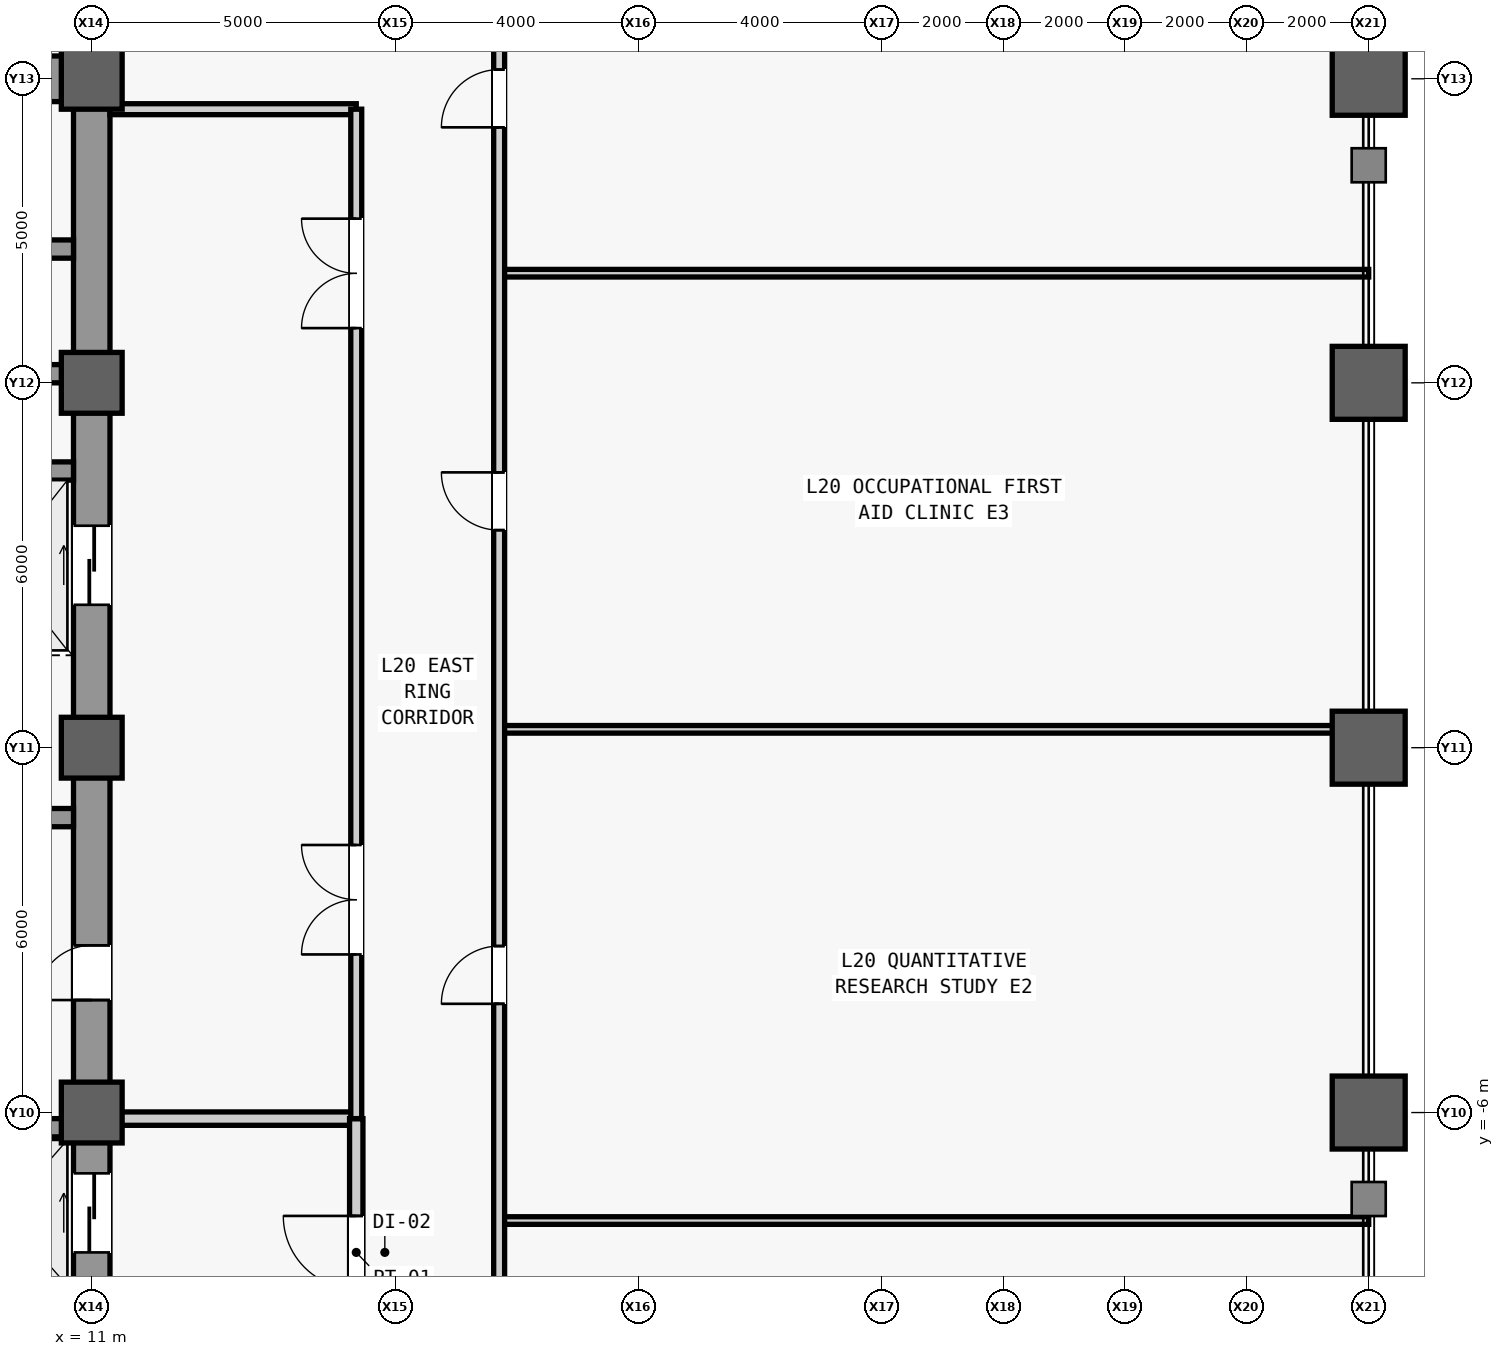
"""IFC4 building model, lengths in metres.
Left out: names, types, materials, properties, quantities, classifications, styles, units other than length and angle.
Written with IfcOpenShell. Run it as: python <this file> out.ifc"""

import sys

from ifc_helpers import new_model, si_unit, direction, frame, frame_2d, origin, origin_2d, place, context, subcontext, project, spatial, rectangle, hollow_rectangle, extrude, source, transform, mapped, element, fill, save


model = new_model("IFC4")
c1 = context("Model", 3, precision=1e-05, world=origin(), true_north=direction((0.0, 1.0)))
c2 = subcontext(c1, "Body", "Model", "MODEL_VIEW")
j1 = project(units=[si_unit("LENGTHUNIT", "METRE"), si_unit("PLANEANGLEUNIT", "RADIAN")], contexts=[c1])
p1 = place(None, origin())
s1 = spatial("IfcSite", under=j1, at=p1, CompositionType="ELEMENT")
p2 = place(p1, origin())
s2 = spatial("IfcBuilding", under=s1, at=p2, CompositionType="ELEMENT")
p3 = place(p2, frame((0.0, 0.0, 91.4)))
s3 = spatial("IfcBuildingStorey", under=s2, at=p3, CompositionType="ELEMENT", Elevation=91.4)
m1 = source(origin(), c2, "Body", "SweptSolid", [
    extrude(rectangle(XDim=22.0, YDim=0.6, at=frame_2d((11.0, 0.0))), origin(), (0.0, 0.0, 1.0), 3.84),
])
p4 = place(p3, frame((11.0, -11.0, 0.0), z_axis=(0.0, 0.0, 1.0), x_axis=(0.0, 1.0, 0.0)))
e1 = element("IfcWall", 1, at=p4, inside=s3, PredefinedType="SHEAR", context=c2, shape_type="MappedRepresentation", body=[
    mapped(m1, transform((0.0, 0.0, 0.0), scale=1.0)),
])
m2 = source(origin(), c2, "Body", "SweptSolid", [
    extrude(rectangle(XDim=1.1, YDim=2.2, at=frame_2d((0.55, 1.1))), frame((0.0, 0.31, 0.0), z_axis=(0.0, -1.0, 0.0), x_axis=(1.0, 0.0, 0.0)), (0.0, 0.0, 1.0), 0.62),
])
p5 = place(p4, frame((0.8, 0.0, 0.0)))
e2 = element("IfcOpeningElement", 2, at=p5, cuts=e1, PredefinedType="OPENING", context=c2, shape_type="MappedRepresentation", body=[
    mapped(m2, transform((0.0, 0.0, 0.0), scale=1.0)),
])
m3 = source(origin(), c2, "Body", "SweptSolid", [
    extrude(rectangle(XDim=0.9, YDim=2.15, at=frame_2d((0.45, 1.075))), frame((0.0, 0.31, 0.0), z_axis=(0.0, -1.0, 0.0), x_axis=(1.0, 0.0, 0.0)), (0.0, 0.0, 1.0), 0.62),
])
p6 = place(p4, frame((6.85, 0.0, 0.0)))
e3 = element("IfcOpeningElement", 3, at=p6, cuts=e1, PredefinedType="OPENING", context=c2, shape_type="MappedRepresentation", body=[
    mapped(m3, transform((0.0, 0.0, 0.0), scale=1.0)),
])
m4 = source(origin(), c2, "Body", "SweptSolid", [
    extrude(rectangle(XDim=1.3, YDim=2.3, at=frame_2d((0.65, 1.15))), frame((0.0, 0.31, 0.0), z_axis=(0.0, -1.0, 0.0), x_axis=(1.0, 0.0, 0.0)), (0.0, 0.0, 1.0), 0.62),
])
p7 = place(p4, frame((2.7, 0.0, 0.0)))
e4 = element("IfcOpeningElement", 4, at=p7, cuts=e1, PredefinedType="OPENING", context=c2, shape_type="MappedRepresentation", body=[
    mapped(m4, transform((0.0, 0.0, 0.0), scale=1.0)),
])
p8 = place(p4, frame((13.35, 0.0, 0.0)))
e5 = element("IfcOpeningElement", 5, at=p8, cuts=e1, PredefinedType="OPENING", context=c2, shape_type="MappedRepresentation", body=[
    mapped(m4, transform((0.0, 0.0, 0.0), scale=1.0)),
])
m5 = source(origin(), c2, "Body", "SweptSolid", [
    extrude(rectangle(XDim=5.85, YDim=0.75, at=frame_2d((2.925, 0.0))), origin(), (0.0, 0.0, 1.0), 3.84),
])
p9 = place(p3, frame((4.85, 11.0, 0.0), z_axis=(0.0, 0.0, 1.0), x_axis=(1.0, 0.0, 0.0)))
e6 = element("IfcWall", 6, at=p9, inside=s3, PredefinedType="SHEAR", context=c2, shape_type="MappedRepresentation", body=[
    mapped(m5, transform((0.0, 0.0, 0.0), scale=1.0)),
])
m6 = source(origin(), c2, "Body", "SweptSolid", [
    extrude(rectangle(XDim=1.05, YDim=2.2, at=frame_2d((0.525, 1.1))), frame((0.0, 0.385, 0.0), z_axis=(0.0, -1.0, 0.0), x_axis=(1.0, 0.0, 0.0)), (0.0, 0.0, 1.0), 0.77),
])
p10 = place(p9, frame((1.375, 0.0, 0.0)))
e7 = element("IfcOpeningElement", 7, at=p10, cuts=e6, PredefinedType="OPENING", context=c2, shape_type="MappedRepresentation", body=[
    mapped(m6, transform((0.0, 0.0, 0.0), scale=1.0)),
])
m7 = source(origin(), c2, "Body", "SweptSolid", [
    extrude(rectangle(XDim=5.6, YDim=0.3, at=frame_2d((2.8, 0.0))), origin(), (0.0, 0.0, 1.0), 3.84),
])
p11 = place(p3, frame((5.1, -1.15, 0.0), z_axis=(0.0, 0.0, 1.0), x_axis=(1.0, 0.0, 0.0)))
e8 = element("IfcWall", 8, at=p11, inside=s3, PredefinedType="SHEAR", context=c2, shape_type="MappedRepresentation", body=[
    mapped(m7, transform((0.0, 0.0, 0.0), scale=1.0)),
])
m8 = source(origin(), c2, "Body", "SweptSolid", [
    extrude(rectangle(XDim=1.0, YDim=1.0, at=origin_2d()), origin(), (0.0, 0.0, 1.0), 4.1),
])
for number, where, z_axis, x_axis in (
    (9, (11.0, -6.0, 0.0), (0.0, 0.0, 1.0), (1.0, 0.0, 0.0)),
    (10, (11.0, 0.0, 0.0), (0.0, 0.0, 1.0), (1.0, 0.0, 0.0)),
    (11, (11.0, 6.0, 0.0), (0.0, 0.0, 1.0), (1.0, 0.0, 0.0)),
    (12, (11.0, 11.0, 0.0), (0.0, 0.0, 1.0), (1.0, 0.0, 0.0)),
):
    element("IfcColumn", number, at=place(p3, frame(where, z_axis=z_axis, x_axis=x_axis)), inside=s3, PredefinedType="COLUMN", context=c2, shape_type="MappedRepresentation", body=[
        mapped(m8, transform((0.0, 0.0, 0.0), scale=1.0)),
    ])
m9 = source(origin(), c2, "Body", "SweptSolid", [
    extrude(hollow_rectangle(XDim=1.2, YDim=1.2, WallThickness=0.07, at=origin_2d()), origin(), (0.0, 0.0, 1.0), 4.1),
])
for number, where, z_axis, x_axis in (
    (13, (32.0, -6.0, 0.0), (0.0, 0.0, 1.0), (1.0, 0.0, 0.0)),
    (14, (32.0, 0.0, 0.0), (0.0, 0.0, 1.0), (1.0, 0.0, 0.0)),
    (15, (32.0, 6.0, 0.0), (0.0, 0.0, 1.0), (1.0, 0.0, 0.0)),
    (16, (32.0, 11.0, 0.0), (0.0, 0.0, 1.0), (1.0, 0.0, 0.0)),
):
    element("IfcColumn", number, at=place(p3, frame(where, z_axis=z_axis, x_axis=x_axis)), inside=s3, PredefinedType="COLUMN", context=c2, shape_type="MappedRepresentation", body=[
        mapped(m9, transform((0.0, 0.0, 0.0), scale=1.0)),
    ])
m10 = source(origin(), c2, "Body", "SweptSolid", [
    extrude(rectangle(XDim=2.2, YDim=0.3, at=frame_2d((1.1, 0.0))), origin(), (0.0, 0.0, 1.0), 3.84),
])
p12 = place(p3, frame((8.5, -6.25, 0.0), z_axis=(0.0, 0.0, 1.0), x_axis=(1.0, 0.0, 0.0)))
e17 = element("IfcWall", 17, at=p12, inside=s3, PredefinedType="SHEAR", context=c2, shape_type="MappedRepresentation", body=[
    mapped(m10, transform((0.0, 0.0, 0.0), scale=1.0)),
])
m11 = source(origin(), c2, "Body", "SweptSolid", [
    extrude(rectangle(XDim=2.3, YDim=0.3, at=frame_2d((1.15, 0.0))), origin(), (0.0, 0.0, 1.0), 3.84),
])
for number, where, z_axis, x_axis in (
    (18, (8.4, 4.55, 0.0), (0.0, 0.0, 1.0), (1.0, 0.0, 0.0)),
    (19, (8.4, 6.15, 0.0), (0.0, 0.0, 1.0), (1.0, 0.0, 0.0)),
    (20, (8.4, 8.2, 0.0), (0.0, 0.0, 1.0), (1.0, 0.0, 0.0)),
):
    element("IfcWall", number, at=place(p3, frame(where, z_axis=z_axis, x_axis=x_axis)), inside=s3, PredefinedType="SHEAR", context=c2, shape_type="MappedRepresentation", body=[
        mapped(m11, transform((0.0, 0.0, 0.0), scale=1.0)),
    ])
m12 = source(origin(), c2, "Body", "SweptSolid", [
    extrude(rectangle(XDim=4.05, YDim=0.22, at=frame_2d((2.025, 0.0))), origin(), (0.0, 0.0, 1.0), 3.067),
])
p13 = place(p3, frame((11.3, -6.1, 0.0), z_axis=(0.0, 0.0, 1.0), x_axis=(1.0, 0.0, 0.0)))
e21 = element("IfcWall", 21, at=p13, inside=s3, PredefinedType="PARTITIONING", context=c2, shape_type="MappedRepresentation", body=[
    mapped(m12, transform((0.0, 0.0, 0.0), scale=1.0)),
])
m13 = source(origin(), c2, "Body", "SweptSolid", [
    extrude(rectangle(XDim=4.4, YDim=0.22, at=frame_2d((2.2, 0.0))), origin(), (0.0, 0.0, 1.0), 3.84),
])
p14 = place(p3, frame((15.35, -10.5, 0.0), z_axis=(0.0, 0.0, 1.0), x_axis=(0.0, 1.0, 0.0)))
e22 = element("IfcWall", 22, at=p14, inside=s3, PredefinedType="PARTITIONING", context=c2, shape_type="MappedRepresentation", body=[
    mapped(m13, transform((0.0, 0.0, 0.0), scale=1.0)),
])
m14 = source(origin(), c2, "Body", "SweptSolid", [
    extrude(rectangle(XDim=1.2, YDim=2.2, at=frame_2d((0.6, 1.1))), frame((0.0, 0.12, 0.0), z_axis=(0.0, -1.0, 0.0), x_axis=(1.0, 0.0, 0.0)), (0.0, 0.0, 1.0), 0.24),
])
p15 = place(p14, frame((1.6, 0.0, 0.0)))
e23 = element("IfcOpeningElement", 23, at=p15, cuts=e22, PredefinedType="OPENING", context=c2, shape_type="MappedRepresentation", body=[
    mapped(m14, transform((0.0, 0.0, 0.0), scale=1.0)),
])
m15 = source(origin(), c2, "Body", "SweptSolid", [
    extrude(rectangle(XDim=4.05, YDim=0.18, at=frame_2d((2.025, 0.0))), origin(), (0.0, 0.0, 1.0), 3.84),
])
p16 = place(p3, frame((11.3, 10.5, 0.0), z_axis=(0.0, 0.0, 1.0), x_axis=(1.0, 0.0, 0.0)))
e24 = element("IfcWall", 24, at=p16, inside=s3, PredefinedType="PARTITIONING", context=c2, shape_type="MappedRepresentation", body=[
    mapped(m15, transform((0.0, 0.0, 0.0), scale=1.0)),
])
m16 = source(origin(), c2, "Body", "SweptSolid", [
    extrude(rectangle(XDim=16.6, YDim=0.18, at=frame_2d((8.3, 0.0))), origin(), (0.0, 0.0, 1.0), 3.84),
])
p17 = place(p3, frame((15.35, -6.1, 0.0), z_axis=(0.0, 0.0, 1.0), x_axis=(0.0, 1.0, 0.0)))
e25 = element("IfcWall", 25, at=p17, inside=s3, PredefinedType="PARTITIONING", context=c2, shape_type="MappedRepresentation", body=[
    mapped(m16, transform((0.0, 0.0, 0.0), scale=1.0)),
])
m17 = source(origin(), c2, "Body", "SweptSolid", [
    extrude(rectangle(XDim=1.8, YDim=2.25, at=frame_2d((0.9, 1.125))), frame((0.0, 0.1, 0.0), z_axis=(0.0, -1.0, 0.0), x_axis=(1.0, 0.0, 0.0)), (0.0, 0.0, 1.0), 0.2),
])
p18 = place(p17, frame((2.7, 0.0, 0.0)))
e26 = element("IfcOpeningElement", 26, at=p18, cuts=e25, PredefinedType="OPENING", context=c2, shape_type="MappedRepresentation", body=[
    mapped(m17, transform((0.0, 0.0, 0.0), scale=1.0)),
])
p19 = place(p17, frame((13.0, 0.0, 0.0)))
e27 = element("IfcOpeningElement", 27, at=p19, cuts=e25, PredefinedType="OPENING", context=c2, shape_type="MappedRepresentation", body=[
    mapped(m17, transform((0.0, 0.0, 0.0), scale=1.0)),
])
m18 = source(origin(), c2, "Body", "SweptSolid", [
    extrude(rectangle(XDim=14.3, YDim=0.125, at=frame_2d((7.15, 0.0))), origin(), (0.0, 0.0, 1.0), 3.84),
])
p20 = place(p3, frame((17.7, -7.776, 0.0), z_axis=(0.0, 0.0, 1.0), x_axis=(1.0, 0.0, 0.0)))
e28 = element("IfcWall", 28, at=p20, inside=s3, PredefinedType="PARTITIONING", context=c2, shape_type="MappedRepresentation", body=[
    mapped(m18, transform((0.0, 0.0, 0.0), scale=1.0)),
])
m19 = source(origin(), c2, "Body", "SweptSolid", [
    extrude(rectangle(XDim=14.3, YDim=0.125, at=frame_2d((7.15, 0.0))), origin(), (0.0, 0.0, 1.0), 3.067),
])
p21 = place(p3, frame((17.7, 0.302, 0.0), z_axis=(0.0, 0.0, 1.0), x_axis=(1.0, 0.0, 0.0)))
e29 = element("IfcWall", 29, at=p21, inside=s3, PredefinedType="PARTITIONING", context=c2, shape_type="MappedRepresentation", body=[
    mapped(m19, transform((0.0, 0.0, 0.0), scale=1.0)),
])
p22 = place(p3, frame((17.7, 7.803, 0.0), z_axis=(0.0, 0.0, 1.0), x_axis=(1.0, 0.0, 0.0)))
e30 = element("IfcWall", 30, at=p22, inside=s3, PredefinedType="PARTITIONING", context=c2, shape_type="MappedRepresentation", body=[
    mapped(m18, transform((0.0, 0.0, 0.0), scale=1.0)),
])
m20 = source(origin(), c2, "Body", "SweptSolid", [
    extrude(rectangle(XDim=56.0, YDim=0.18, at=frame_2d((28.0, 0.0))), origin(), (0.0, 0.0, 1.0), 3.84),
])
p23 = place(p3, frame((17.7, -28.0, 0.0), z_axis=(0.0, 0.0, 1.0), x_axis=(0.0, 1.0, 0.0)))
e31 = element("IfcWall", 31, at=p23, inside=s3, PredefinedType="PARTITIONING", context=c2, shape_type="MappedRepresentation", body=[
    mapped(m20, transform((0.0, 0.0, 0.0), scale=1.0)),
])
m21 = source(origin(), c2, "Body", "SweptSolid", [
    extrude(rectangle(XDim=0.95, YDim=2.15, at=frame_2d((0.475, 1.075))), frame((0.0, 0.1, 0.0), z_axis=(0.0, -1.0, 0.0), x_axis=(1.0, 0.0, 0.0)), (0.0, 0.0, 1.0), 0.2),
])
p24 = place(p23, frame((16.587, 0.0, 0.0)))
e32 = element("IfcOpeningElement", 32, at=p24, cuts=e31, PredefinedType="OPENING", context=c2, shape_type="MappedRepresentation", body=[
    mapped(m21, transform((0.0, 0.0, 0.0), scale=1.0)),
])
p25 = place(p23, frame((23.788, 0.0, 0.0)))
e33 = element("IfcOpeningElement", 33, at=p25, cuts=e31, PredefinedType="OPENING", context=c2, shape_type="MappedRepresentation", body=[
    mapped(m21, transform((0.0, 0.0, 0.0), scale=1.0)),
])
p26 = place(p23, frame((31.577, 0.0, 0.0)))
e34 = element("IfcOpeningElement", 34, at=p26, cuts=e31, PredefinedType="OPENING", context=c2, shape_type="MappedRepresentation", body=[
    mapped(m21, transform((0.0, 0.0, 0.0), scale=1.0)),
])
p27 = place(p23, frame((38.201, 0.0, 0.0)))
e35 = element("IfcOpeningElement", 35, at=p27, cuts=e31, PredefinedType="OPENING", context=c2, shape_type="MappedRepresentation", body=[
    mapped(m21, transform((0.0, 0.0, 0.0), scale=1.0)),
])
m22 = source(origin(), c2, "Body", "SweptSolid", [
    extrude(rectangle(XDim=0.9, YDim=2.15, at=frame_2d((0.45, 1.075))), frame((0.0, 0.025, 0.0), z_axis=(0.0, -1.0, 0.0), x_axis=(1.0, 0.0, 0.0)), (0.0, 0.0, 1.0), 0.05),
])
p28 = place(p6, origin())
e36 = element("IfcDoor", 36, at=p28, inside=s3, OperationType="SINGLE_SWING_LEFT", PredefinedType="DOOR", context=c2, shape_type="MappedRepresentation", body=[
    mapped(m22, transform((0.0, 0.0, 0.0), scale=1.0)),
])
fill(e3, e36)
m23 = source(origin(), c2, "Body", "SweptSolid", [
    extrude(rectangle(XDim=1.2, YDim=2.2, at=frame_2d((0.6, 1.1))), frame((0.0, 0.025, 0.0), z_axis=(0.0, -1.0, 0.0), x_axis=(1.0, 0.0, 0.0)), (0.0, 0.0, 1.0), 0.05),
])
p29 = place(p15, origin())
e37 = element("IfcDoor", 37, at=p29, inside=s3, OperationType="SINGLE_SWING_RIGHT", PredefinedType="DOOR", context=c2, shape_type="MappedRepresentation", body=[
    mapped(m23, transform((0.0, 0.0, 0.0), scale=1.0)),
])
fill(e23, e37)
m24 = source(origin(), c2, "Body", "SweptSolid", [
    extrude(rectangle(XDim=1.8, YDim=2.25, at=frame_2d((0.9, 1.125))), frame((0.0, 0.025, 0.0), z_axis=(0.0, -1.0, 0.0), x_axis=(1.0, 0.0, 0.0)), (0.0, 0.0, 1.0), 0.05),
])
p30 = place(p18, origin())
e38 = element("IfcDoor", 38, at=p30, inside=s3, OperationType="SINGLE_SWING_RIGHT", PredefinedType="DOOR", context=c2, shape_type="MappedRepresentation", body=[
    mapped(m24, transform((0.0, 0.0, 0.0), scale=1.0)),
])
fill(e26, e38)
p31 = place(p19, origin())
e39 = element("IfcDoor", 39, at=p31, inside=s3, OperationType="SINGLE_SWING_LEFT", PredefinedType="DOOR", context=c2, shape_type="MappedRepresentation", body=[
    mapped(m24, transform((0.0, 0.0, 0.0), scale=1.0)),
])
fill(e27, e39)
m25 = source(origin(), c2, "Body", "SweptSolid", [
    extrude(rectangle(XDim=0.95, YDim=2.15, at=frame_2d((0.475, 1.075))), frame((0.0, 0.025, 0.0), z_axis=(0.0, -1.0, 0.0), x_axis=(1.0, 0.0, 0.0)), (0.0, 0.0, 1.0), 0.05),
])
p32 = place(p25, origin())
e40 = element("IfcDoor", 40, at=p32, inside=s3, OperationType="SINGLE_SWING_LEFT", PredefinedType="DOOR", context=c2, shape_type="MappedRepresentation", body=[
    mapped(m25, transform((0.0, 0.0, 0.0), scale=1.0)),
])
fill(e33, e40)
p33 = place(p26, origin())
e41 = element("IfcDoor", 41, at=p33, inside=s3, OperationType="SINGLE_SWING_RIGHT", PredefinedType="DOOR", context=c2, shape_type="MappedRepresentation", body=[
    mapped(m25, transform((0.0, 0.0, 0.0), scale=1.0)),
])
fill(e34, e41)
p34 = place(p27, origin())
e42 = element("IfcDoor", 42, at=p34, inside=s3, OperationType="SINGLE_SWING_LEFT", PredefinedType="DOOR", context=c2, shape_type="MappedRepresentation", body=[
    mapped(m25, transform((0.0, 0.0, 0.0), scale=1.0)),
])
fill(e35, e42)
m26 = source(origin(), c2, "Body", "SweptSolid", [
    extrude(rectangle(XDim=1.3, YDim=2.3, at=frame_2d((0.65, 1.15))), frame((0.0, 0.025, 0.0), z_axis=(0.0, -1.0, 0.0), x_axis=(1.0, 0.0, 0.0)), (0.0, 0.0, 1.0), 0.05),
])
p35 = place(p7, origin())
e43 = element("IfcDoor", 43, at=p35, inside=s3, OperationType="SLIDING_TO_LEFT", PredefinedType="DOOR", context=c2, shape_type="MappedRepresentation", body=[
    mapped(m26, transform((0.0, 0.0, 0.0), scale=1.0)),
])
fill(e4, e43)
p36 = place(p8, origin())
e44 = element("IfcDoor", 44, at=p36, inside=s3, OperationType="SLIDING_TO_LEFT", PredefinedType="DOOR", context=c2, shape_type="MappedRepresentation", body=[
    mapped(m26, transform((0.0, 0.0, 0.0), scale=1.0)),
])
fill(e5, e44)
save(model, sys.argv[1])
